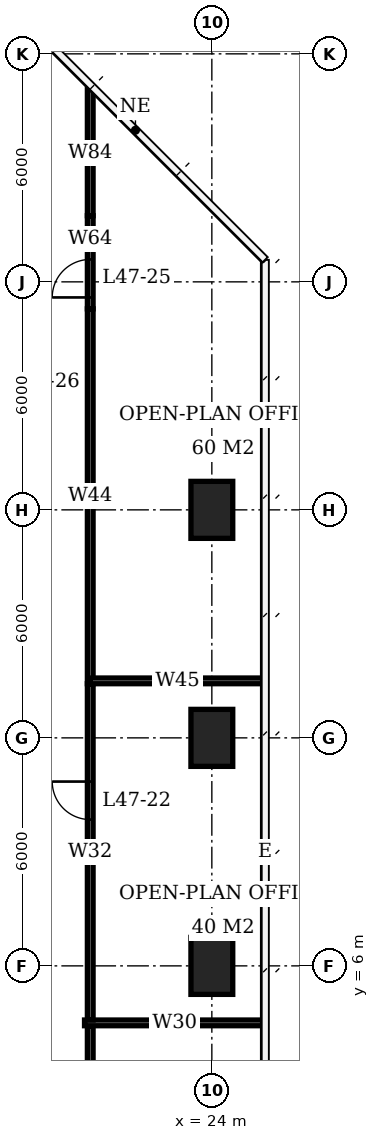
"""IFC4 building model, lengths in metres.
Left out: names, types, materials, properties, quantities, classifications, styles, units other than length and angle.
Written with IfcOpenShell. Run it as: python <this file> out.ifc"""

import sys

from ifc_helpers import new_model, si_unit, direction, frame, frame_2d, origin, origin_2d, place, context, subcontext, project, spatial, rectangle, extrude, element, fill, save


model = new_model("IFC4")
c1 = context("Model", 3, precision=1e-05, world=origin(), true_north=direction((0.0, 1.0)))
c2 = subcontext(c1, "Body", "Model", "MODEL_VIEW")
j1 = project(units=[si_unit("LENGTHUNIT", "METRE"), si_unit("PLANEANGLEUNIT", "RADIAN")], contexts=[c1])
p1 = place(None, origin())
s1 = spatial("IfcSite", under=j1, at=p1, CompositionType="ELEMENT")
p2 = place(p1, origin())
s2 = spatial("IfcBuilding", under=s1, at=p2, CompositionType="ELEMENT")
p3 = place(p2, frame((0.0, 0.0, 192.8)))
s3 = spatial("IfcBuildingStorey", under=s2, at=p3, CompositionType="ELEMENT", Elevation=192.8)
for number, where, z_axis, x_axis in (
    (1, (24.0, 6.0, 0.0), (0.0, 0.0, 1.0), (0.0, 1.0, 0.0)),
    (2, (24.0, 12.0, 0.0), (0.0, 0.0, 1.0), (0.0, 1.0, 0.0)),
    (3, (24.0, 18.0, 0.0), (0.0, 0.0, 1.0), (0.0, 1.0, 0.0)),
):
    element("IfcColumn", number, at=place(p3, frame(where, z_axis=z_axis, x_axis=x_axis)), inside=s3, PredefinedType="COLUMN", context=c2, shape_type="SweptSolid", body=[
        extrude(rectangle(XDim=1.5, YDim=1.1, at=origin_2d()), origin(), (0.0, 0.0, 1.0), 3.9),
    ])
p4 = place(p3, frame((20.8, -11.064, 0.0), z_axis=(0.0, 0.0, 1.0), x_axis=(0.0, 1.0, 0.0)))
e4 = element("IfcWall", 4, at=p4, inside=s3, PredefinedType="PARTITIONING", context=c2, shape_type="SweptSolid", body=[
    extrude(rectangle(XDim=15.489, YDim=0.15, at=frame_2d((7.745, 0.0))), origin(), (0.0, 0.0, 1.0), 3.65),
])
p5 = place(p4, frame((9.625, 0.0, 0.0)))
e5 = element("IfcOpeningElement", 5, at=p5, cuts=e4, PredefinedType="OPENING", context=c2, shape_type="SweptSolid", body=[
    extrude(rectangle(XDim=1.0, YDim=2.1, at=frame_2d((0.5, 1.05))), frame((0.0, 0.085, 0.0), z_axis=(0.0, -1.0, 0.0), x_axis=(1.0, 0.0, 0.0)), (0.0, 0.0, 1.0), 0.17),
])
p6 = place(p3, frame((20.8, 4.575, 0.0), z_axis=(0.0, 0.0, 1.0), x_axis=(0.0, 1.0, 0.0)))
e6 = element("IfcWall", 6, at=p6, inside=s3, PredefinedType="PARTITIONING", context=c2, shape_type="SweptSolid", body=[
    extrude(rectangle(XDim=8.85, YDim=0.15, at=frame_2d((4.425, 0.0))), origin(), (0.0, 0.0, 1.0), 3.65),
])
p7 = place(p6, frame((5.275, 0.0, 0.0)))
e7 = element("IfcOpeningElement", 7, at=p7, cuts=e6, PredefinedType="OPENING", context=c2, shape_type="SweptSolid", body=[
    extrude(rectangle(XDim=1.0, YDim=2.1, at=frame_2d((0.5, 1.05))), frame((0.0, 0.085, 0.0), z_axis=(0.0, -1.0, 0.0), x_axis=(1.0, 0.0, 0.0)), (0.0, 0.0, 1.0), 0.17),
])
p8 = place(p3, frame((20.65, 4.5, 0.0), z_axis=(0.0, 0.0, 1.0), x_axis=(1.0, 0.0, 0.0)))
e8 = element("IfcWall", 8, at=p8, inside=s3, PredefinedType="PARTITIONING", context=c2, shape_type="SweptSolid", body=[
    extrude(rectangle(XDim=4.75, YDim=0.15, at=frame_2d((2.375, 0.0))), origin(), (0.0, 0.0, 1.0), 3.65),
])
p9 = place(p3, frame((20.8, 13.425, 0.0), z_axis=(0.0, 0.0, 1.0), x_axis=(0.0, 1.0, 0.0)))
e9 = element("IfcWall", 9, at=p9, inside=s3, PredefinedType="PARTITIONING", context=c2, shape_type="SweptSolid", body=[
    extrude(rectangle(XDim=9.865, YDim=0.15, at=frame_2d((4.933, 0.0))), origin(), (0.0, 0.0, 1.0), 3.65),
])
p10 = place(p3, frame((20.8, 23.29, 0.0), z_axis=(0.0, 0.0, 1.0), x_axis=(0.0, 1.0, 0.0)))
e10 = element("IfcWall", 10, at=p10, inside=s3, PredefinedType="PARTITIONING", context=c2, shape_type="SweptSolid", body=[
    extrude(rectangle(XDim=2.45, YDim=0.15, at=frame_2d((1.225, 0.0))), origin(), (0.0, 0.0, 1.0), 2.65),
])
p11 = place(p10, frame((0.3, 0.0, 0.0)))
e11 = element("IfcOpeningElement", 11, at=p11, cuts=e10, PredefinedType="OPENING", context=c2, shape_type="SweptSolid", body=[
    extrude(rectangle(XDim=1.0, YDim=2.1, at=frame_2d((0.5, 1.05))), frame((0.0, 0.085, 0.0), z_axis=(0.0, -1.0, 0.0), x_axis=(1.0, 0.0, 0.0)), (0.0, 0.0, 1.0), 0.17),
])
p12 = place(p3, frame((20.8, 25.74, 0.0), z_axis=(0.0, 0.0, 1.0), x_axis=(0.0, 1.0, 0.0)))
e12 = element("IfcWall", 12, at=p12, inside=s3, PredefinedType="PARTITIONING", context=c2, shape_type="SweptSolid", body=[
    extrude(rectangle(XDim=3.324, YDim=0.15, at=frame_2d((1.662, 0.0))), origin(), (0.0, 0.0, 1.0), 3.65),
])
p13 = place(p3, frame((20.8, 13.5, 0.0), z_axis=(0.0, 0.0, 1.0), x_axis=(1.0, 0.0, 0.0)))
e13 = element("IfcWall", 13, at=p13, inside=s3, PredefinedType="PARTITIONING", context=c2, shape_type="SweptSolid", body=[
    extrude(rectangle(XDim=4.6, YDim=0.15, at=frame_2d((2.3, 0.0))), origin(), (0.0, 0.0, 1.0), 3.65),
])
p14 = place(p7, origin())
e14 = element("IfcDoor", 14, at=p14, inside=s3, OperationType="SINGLE_SWING_RIGHT", PredefinedType="DOOR", context=c2, shape_type="SweptSolid", body=[
    extrude(rectangle(XDim=1.0, YDim=2.1, at=frame_2d((0.5, 1.05))), frame((0.0, 0.025, 0.0), z_axis=(0.0, -1.0, 0.0), x_axis=(1.0, 0.0, 0.0)), (0.0, 0.0, 1.0), 0.05),
])
fill(e7, e14)
p15 = place(p11, origin())
e15 = element("IfcDoor", 15, at=p15, inside=s3, OperationType="SINGLE_SWING_LEFT", PredefinedType="DOOR", context=c2, shape_type="SweptSolid", body=[
    extrude(rectangle(XDim=1.0, YDim=2.1, at=frame_2d((0.5, 1.05))), frame((0.0, 0.025, 0.0), z_axis=(0.0, -1.0, 0.0), x_axis=(1.0, 0.0, 0.0)), (0.0, 0.0, 1.0), 0.05),
])
fill(e11, e15)
save(model, sys.argv[1])
